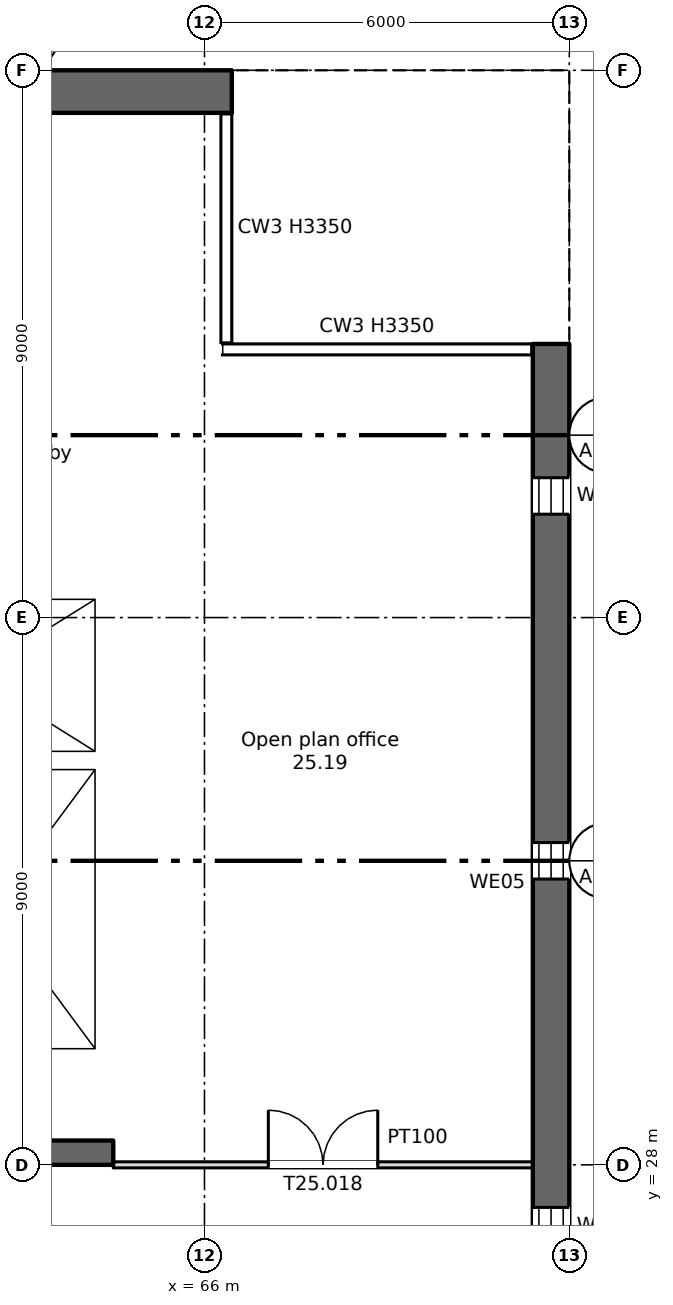
"""IFC4 building model, lengths in metres.
Left out: names, types, materials, properties, quantities, classifications, styles, units other than length and angle.
Written with IfcOpenShell. Run it as: python <this file> out.ifc"""

import sys

from ifc_helpers import new_model, si_unit, direction, frame, frame_2d, origin, place, context, subcontext, project, spatial, rectangle, extrude, element, fill, save


model = new_model("IFC4")
c1 = context("Model", 3, precision=1e-05, world=origin(), true_north=direction((0.0, 1.0)))
c2 = subcontext(c1, "Body", "Model", "MODEL_VIEW")
j1 = project(units=[si_unit("LENGTHUNIT", "METRE"), si_unit("PLANEANGLEUNIT", "RADIAN")], contexts=[c1])
p1 = place(None, origin())
s1 = spatial("IfcSite", under=j1, at=p1, CompositionType="ELEMENT")
p2 = place(p1, origin())
s2 = spatial("IfcBuilding", under=s1, at=p2, CompositionType="ELEMENT")
p3 = place(p2, frame((0.0, 0.0, 170.5)))
s3 = spatial("IfcBuildingStorey", under=s2, at=p3, CompositionType="ELEMENT", Elevation=170.5)
p4 = place(p3, frame((71.7, 7.5, 0.0), z_axis=(0.0, 0.0, 1.0), x_axis=(0.0, 1.0, 0.0)))
e1 = element("IfcWall", 1, at=p4, inside=s3, PredefinedType="SHEAR", context=c2, shape_type="SweptSolid", body=[
    extrude(rectangle(XDim=34.0, YDim=0.6, at=frame_2d((17.0, 0.0))), origin(), (0.0, 0.0, 1.0), 3.35),
])
p5 = place(p4, frame((1.2, 0.0, 0.6)))
e2 = element("IfcOpeningElement", 2, at=p5, cuts=e1, PredefinedType="OPENING", context=c2, shape_type="SweptSolid", body=[
    extrude(rectangle(XDim=0.6, YDim=2.4, at=frame_2d((0.3, 1.2))), frame((0.0, 0.31, 0.0), z_axis=(0.0, -1.0, 0.0), x_axis=(1.0, 0.0, 0.0)), (0.0, 0.0, 1.0), 0.62),
])
p6 = place(p4, frame((7.2, 0.0, 0.6)))
e3 = element("IfcOpeningElement", 3, at=p6, cuts=e1, PredefinedType="OPENING", context=c2, shape_type="SweptSolid", body=[
    extrude(rectangle(XDim=0.6, YDim=2.4, at=frame_2d((0.3, 1.2))), frame((0.0, 0.31, 0.0), z_axis=(0.0, -1.0, 0.0), x_axis=(1.0, 0.0, 0.0)), (0.0, 0.0, 1.0), 0.62),
])
p7 = place(p4, frame((13.2, 0.0, 0.6)))
e4 = element("IfcOpeningElement", 4, at=p7, cuts=e1, PredefinedType="OPENING", context=c2, shape_type="SweptSolid", body=[
    extrude(rectangle(XDim=0.6, YDim=2.4, at=frame_2d((0.3, 1.2))), frame((0.0, 0.31, 0.0), z_axis=(0.0, -1.0, 0.0), x_axis=(1.0, 0.0, 0.0)), (0.0, 0.0, 1.0), 0.62),
])
p8 = place(p4, frame((19.2, 0.0, 0.6)))
e5 = element("IfcOpeningElement", 5, at=p8, cuts=e1, PredefinedType="OPENING", context=c2, shape_type="SweptSolid", body=[
    extrude(rectangle(XDim=0.6, YDim=2.4, at=frame_2d((0.3, 1.2))), frame((0.0, 0.31, 0.0), z_axis=(0.0, -1.0, 0.0), x_axis=(1.0, 0.0, 0.0)), (0.0, 0.0, 1.0), 0.62),
])
p9 = place(p4, frame((25.2, 0.0, 0.6)))
e6 = element("IfcOpeningElement", 6, at=p9, cuts=e1, PredefinedType="OPENING", context=c2, shape_type="SweptSolid", body=[
    extrude(rectangle(XDim=0.6, YDim=2.4, at=frame_2d((0.3, 1.2))), frame((0.0, 0.31, 0.0), z_axis=(0.0, -1.0, 0.0), x_axis=(1.0, 0.0, 0.0)), (0.0, 0.0, 1.0), 0.62),
])
p10 = place(p4, frame((31.2, 0.0, 0.6)))
e7 = element("IfcOpeningElement", 7, at=p10, cuts=e1, PredefinedType="OPENING", context=c2, shape_type="SweptSolid", body=[
    extrude(rectangle(XDim=0.6, YDim=2.4, at=frame_2d((0.3, 1.2))), frame((0.0, 0.31, 0.0), z_axis=(0.0, -1.0, 0.0), x_axis=(1.0, 0.0, 0.0)), (0.0, 0.0, 1.0), 0.62),
])
p11 = place(p3, frame((11.55, 45.65, 0.0), z_axis=(0.0, 0.0, 1.0), x_axis=(1.0, 0.0, 0.0)))
e8 = element("IfcWall", 8, at=p11, inside=s3, PredefinedType="SHEAR", context=c2, shape_type="SweptSolid", body=[
    extrude(rectangle(XDim=54.9, YDim=0.7, at=frame_2d((27.45, 0.0))), origin(), (0.0, 0.0, 1.0), 3.35),
])
p12 = place(p11, frame((1.2, 0.0, 0.6)))
e9 = element("IfcOpeningElement", 9, at=p12, cuts=e8, PredefinedType="OPENING", context=c2, shape_type="SweptSolid", body=[
    extrude(rectangle(XDim=0.6, YDim=2.4, at=frame_2d((0.3, 1.2))), frame((0.0, 0.36, 0.0), z_axis=(0.0, -1.0, 0.0), x_axis=(1.0, 0.0, 0.0)), (0.0, 0.0, 1.0), 0.72),
])
p13 = place(p3, frame((6.6, 28.2, 0.0), z_axis=(0.0, 0.0, 1.0), x_axis=(1.0, 0.0, 0.0)))
e10 = element("IfcWall", 10, at=p13, inside=s3, PredefinedType="SHEAR", context=c2, shape_type="SweptSolid", body=[
    extrude(rectangle(XDim=57.9, YDim=0.4, at=frame_2d((28.95, 0.0))), origin(), (0.0, 0.0, 1.0), 3.35),
])
p14 = place(p13, frame((12.163, 0.0, 0.0)))
e11 = element("IfcOpeningElement", 11, at=p14, cuts=e10, PredefinedType="OPENING", context=c2, shape_type="SweptSolid", body=[
    extrude(rectangle(XDim=0.9, YDim=2.1, at=frame_2d((0.45, 1.05))), frame((0.0, 0.21, 0.0), z_axis=(0.0, -1.0, 0.0), x_axis=(1.0, 0.0, 0.0)), (0.0, 0.0, 1.0), 0.42),
])
p15 = place(p13, frame((14.738, 0.0, 0.0)))
e12 = element("IfcOpeningElement", 12, at=p15, cuts=e10, PredefinedType="OPENING", context=c2, shape_type="SweptSolid", body=[
    extrude(rectangle(XDim=0.9, YDim=2.1, at=frame_2d((0.45, 1.05))), frame((0.0, 0.21, 0.0), z_axis=(0.0, -1.0, 0.0), x_axis=(1.0, 0.0, 0.0)), (0.0, 0.0, 1.0), 0.42),
])
p16 = place(p13, frame((49.163, 0.0, 0.0)))
e13 = element("IfcOpeningElement", 13, at=p16, cuts=e10, PredefinedType="OPENING", context=c2, shape_type="SweptSolid", body=[
    extrude(rectangle(XDim=0.9, YDim=2.1, at=frame_2d((0.45, 1.05))), frame((0.0, 0.21, 0.0), z_axis=(0.0, -1.0, 0.0), x_axis=(1.0, 0.0, 0.0)), (0.0, 0.0, 1.0), 0.42),
])
p17 = place(p13, frame((51.738, 0.0, 0.0)))
e14 = element("IfcOpeningElement", 14, at=p17, cuts=e10, PredefinedType="OPENING", context=c2, shape_type="SweptSolid", body=[
    extrude(rectangle(XDim=0.9, YDim=2.1, at=frame_2d((0.45, 1.05))), frame((0.0, 0.21, 0.0), z_axis=(0.0, -1.0, 0.0), x_axis=(1.0, 0.0, 0.0)), (0.0, 0.0, 1.0), 0.42),
])
p18 = place(p13, frame((1.45, 0.0, 0.0)))
e15 = element("IfcOpeningElement", 15, at=p18, cuts=e10, PredefinedType="OPENING", context=c2, shape_type="SweptSolid", body=[
    extrude(rectangle(XDim=0.9, YDim=2.1, at=frame_2d((0.45, 1.05))), frame((0.0, 0.21, 0.0), z_axis=(0.0, -1.0, 0.0), x_axis=(1.0, 0.0, 0.0)), (0.0, 0.0, 1.0), 0.42),
])
p19 = place(p13, frame((4.8, 0.0, 0.0)))
e16 = element("IfcOpeningElement", 16, at=p19, cuts=e10, PredefinedType="OPENING", context=c2, shape_type="SweptSolid", body=[
    extrude(rectangle(XDim=1.2, YDim=2.1, at=frame_2d((0.6, 1.05))), frame((0.0, 0.21, 0.0), z_axis=(0.0, -1.0, 0.0), x_axis=(1.0, 0.0, 0.0)), (0.0, 0.0, 1.0), 0.42),
])
p20 = place(p13, frame((31.8, 0.0, 0.0)))
e17 = element("IfcOpeningElement", 17, at=p20, cuts=e10, PredefinedType="OPENING", context=c2, shape_type="SweptSolid", body=[
    extrude(rectangle(XDim=1.2, YDim=2.1, at=frame_2d((0.6, 1.05))), frame((0.0, 0.21, 0.0), z_axis=(0.0, -1.0, 0.0), x_axis=(1.0, 0.0, 0.0)), (0.0, 0.0, 1.0), 0.42),
])
p21 = place(p13, frame((55.3, 0.0, 0.0)))
e18 = element("IfcOpeningElement", 18, at=p21, cuts=e10, PredefinedType="OPENING", context=c2, shape_type="SweptSolid", body=[
    extrude(rectangle(XDim=1.2, YDim=2.1, at=frame_2d((0.6, 1.05))), frame((0.0, 0.21, 0.0), z_axis=(0.0, -1.0, 0.0), x_axis=(1.0, 0.0, 0.0)), (0.0, 0.0, 1.0), 0.42),
])
p22 = place(p13, frame((21.8, 0.0, 0.0)))
e19 = element("IfcOpeningElement", 19, at=p22, cuts=e10, PredefinedType="OPENING", context=c2, shape_type="SweptSolid", body=[
    extrude(rectangle(XDim=1.2, YDim=2.1, at=frame_2d((0.6, 1.05))), frame((0.0, 0.21, 0.0), z_axis=(0.0, -1.0, 0.0), x_axis=(1.0, 0.0, 0.0)), (0.0, 0.0, 1.0), 0.42),
])
p23 = place(p13, frame((41.8, 0.0, 0.0)))
e20 = element("IfcOpeningElement", 20, at=p23, cuts=e10, PredefinedType="OPENING", context=c2, shape_type="SweptSolid", body=[
    extrude(rectangle(XDim=1.2, YDim=2.1, at=frame_2d((0.6, 1.05))), frame((0.0, 0.21, 0.0), z_axis=(0.0, -1.0, 0.0), x_axis=(1.0, 0.0, 0.0)), (0.0, 0.0, 1.0), 0.42),
])
p24 = place(p13, frame((24.95, 0.0, 0.0)))
e21 = element("IfcOpeningElement", 21, at=p24, cuts=e10, PredefinedType="OPENING", context=c2, shape_type="SweptSolid", body=[
    extrude(rectangle(XDim=2.4, YDim=2.1, at=frame_2d((1.2, 1.05))), frame((0.0, 0.21, 0.0), z_axis=(0.0, -1.0, 0.0), x_axis=(1.0, 0.0, 0.0)), (0.0, 0.0, 1.0), 0.42),
])
p25 = place(p13, frame((37.45, 0.0, 0.0)))
e22 = element("IfcOpeningElement", 22, at=p25, cuts=e10, PredefinedType="OPENING", context=c2, shape_type="SweptSolid", body=[
    extrude(rectangle(XDim=2.4, YDim=2.1, at=frame_2d((1.2, 1.05))), frame((0.0, 0.21, 0.0), z_axis=(0.0, -1.0, 0.0), x_axis=(1.0, 0.0, 0.0)), (0.0, 0.0, 1.0), 0.42),
])
p26 = place(p13, frame((8.1, 0.0, 0.0)))
e23 = element("IfcOpeningElement", 23, at=p26, cuts=e10, PredefinedType="OPENING", context=c2, shape_type="SweptSolid", body=[
    extrude(rectangle(XDim=2.4, YDim=2.1, at=frame_2d((1.2, 1.05))), frame((0.0, 0.21, 0.0), z_axis=(0.0, -1.0, 0.0), x_axis=(1.0, 0.0, 0.0)), (0.0, 0.0, 1.0), 0.42),
])
p27 = place(p13, frame((28.95, 0.0, 0.0)))
e24 = element("IfcOpeningElement", 24, at=p27, cuts=e10, PredefinedType="OPENING", context=c2, shape_type="SweptSolid", body=[
    extrude(rectangle(XDim=0.9, YDim=2.1, at=frame_2d((0.45, 1.05))), frame((0.0, 0.21, 0.0), z_axis=(0.0, -1.0, 0.0), x_axis=(1.0, 0.0, 0.0)), (0.0, 0.0, 1.0), 0.42),
])
p28 = place(p13, frame((34.95, 0.0, 0.0)))
e25 = element("IfcOpeningElement", 25, at=p28, cuts=e10, PredefinedType="OPENING", context=c2, shape_type="SweptSolid", body=[
    extrude(rectangle(XDim=0.9, YDim=2.1, at=frame_2d((0.45, 1.05))), frame((0.0, 0.21, 0.0), z_axis=(0.0, -1.0, 0.0), x_axis=(1.0, 0.0, 0.0)), (0.0, 0.0, 1.0), 0.42),
])
p29 = place(p3, frame((64.35, 34.8, 0.0), z_axis=(0.0, 0.0, 1.0), x_axis=(0.0, 1.0, 0.0)))
e26 = element("IfcWall", 26, at=p29, inside=s3, PredefinedType="SHEAR", context=c2, shape_type="SweptSolid", body=[
    extrude(rectangle(XDim=10.5, YDim=0.3, at=frame_2d((5.25, 0.0))), origin(), (0.0, 0.0, 1.0), 3.35),
])
p30 = place(p3, frame((64.35, 28.4, 0.0), z_axis=(0.0, 0.0, 1.0), x_axis=(0.0, 1.0, 0.0)))
e27 = element("IfcWall", 27, at=p30, inside=s3, PredefinedType="SHEAR", context=c2, shape_type="SweptSolid", body=[
    extrude(rectangle(XDim=6.1, YDim=0.3, at=frame_2d((3.05, 0.0))), origin(), (0.0, 0.0, 1.0), 3.35),
])
p31 = place(p3, frame((60.2, 34.65, 0.0), z_axis=(0.0, 0.0, 1.0), x_axis=(1.0, 0.0, 0.0)))
e28 = element("IfcWall", 28, at=p31, inside=s3, PredefinedType="SHEAR", context=c2, shape_type="SweptSolid", body=[
    extrude(rectangle(XDim=4.3, YDim=0.3, at=frame_2d((2.15, 0.0))), origin(), (0.0, 0.0, 1.0), 3.35),
])
p32 = place(p3, frame((60.2, 37.45, 0.0), z_axis=(0.0, 0.0, 1.0), x_axis=(1.0, 0.0, 0.0)))
e29 = element("IfcWall", 29, at=p32, inside=s3, PredefinedType="SHEAR", context=c2, shape_type="SweptSolid", body=[
    extrude(rectangle(XDim=4.0, YDim=0.3, at=frame_2d((2.0, 0.0))), origin(), (0.0, 0.0, 1.0), 3.35),
])
p33 = place(p32, frame((1.45, 0.0, 0.0)))
e30 = element("IfcOpeningElement", 30, at=p33, cuts=e29, PredefinedType="OPENING", context=c2, shape_type="SweptSolid", body=[
    extrude(rectangle(XDim=1.1, YDim=2.1, at=frame_2d((0.55, 1.05))), frame((0.0, 0.16, 0.0), z_axis=(0.0, -1.0, 0.0), x_axis=(1.0, 0.0, 0.0)), (0.0, 0.0, 1.0), 0.32),
])
p34 = place(p3, frame((64.5, 28.0, 0.0), z_axis=(0.0, 0.0, 1.0), x_axis=(1.0, 0.0, 0.0)))
e31 = element("IfcWall", 31, at=p34, inside=s3, PredefinedType="PARTITIONING", context=c2, shape_type="SweptSolid", body=[
    extrude(rectangle(XDim=6.9, YDim=0.1, at=frame_2d((3.45, 0.0))), origin(), (0.0, 0.0, 1.0), 3.35),
])
p35 = place(p34, frame((2.55, 0.0, 0.0)))
e32 = element("IfcOpeningElement", 32, at=p35, cuts=e31, PredefinedType="OPENING", context=c2, shape_type="SweptSolid", body=[
    extrude(rectangle(XDim=1.8, YDim=2.1, at=frame_2d((0.9, 1.05))), frame((0.0, 0.06, 0.0), z_axis=(0.0, -1.0, 0.0), x_axis=(1.0, 0.0, 0.0)), (0.0, 0.0, 1.0), 0.12),
])
p36 = place(p8, origin())
e33 = element("IfcWindow", 33, at=p36, inside=s3, PartitioningType="SINGLE_PANEL", PredefinedType="WINDOW", context=c2, shape_type="SweptSolid", body=[
    extrude(rectangle(XDim=0.6, YDim=2.4, at=frame_2d((0.3, 1.2))), frame((0.0, 0.03, 0.0), z_axis=(0.0, -1.0, 0.0), x_axis=(1.0, 0.0, 0.0)), (0.0, 0.0, 1.0), 0.06),
])
fill(e5, e33)
p37 = place(p9, origin())
e34 = element("IfcWindow", 34, at=p37, inside=s3, PartitioningType="SINGLE_PANEL", PredefinedType="WINDOW", context=c2, shape_type="SweptSolid", body=[
    extrude(rectangle(XDim=0.6, YDim=2.4, at=frame_2d((0.3, 1.2))), frame((0.0, 0.03, 0.0), z_axis=(0.0, -1.0, 0.0), x_axis=(1.0, 0.0, 0.0)), (0.0, 0.0, 1.0), 0.06),
])
fill(e6, e34)
p38 = place(p10, origin())
e35 = element("IfcWindow", 35, at=p38, inside=s3, PartitioningType="SINGLE_PANEL", PredefinedType="WINDOW", context=c2, shape_type="SweptSolid", body=[
    extrude(rectangle(XDim=0.6, YDim=2.4, at=frame_2d((0.3, 1.2))), frame((0.0, 0.03, 0.0), z_axis=(0.0, -1.0, 0.0), x_axis=(1.0, 0.0, 0.0)), (0.0, 0.0, 1.0), 0.06),
])
fill(e7, e35)
p39 = place(p35, origin())
e36 = element("IfcDoor", 36, at=p39, inside=s3, OperationType="DOUBLE_DOOR_SINGLE_SWING", PredefinedType="DOOR", context=c2, shape_type="SweptSolid", body=[
    extrude(rectangle(XDim=1.8, YDim=2.1, at=frame_2d((0.9, 1.05))), frame((0.0, 0.025, 0.0), z_axis=(0.0, -1.0, 0.0), x_axis=(1.0, 0.0, 0.0)), (0.0, 0.0, 1.0), 0.05),
])
fill(e32, e36)
save(model, sys.argv[1])
